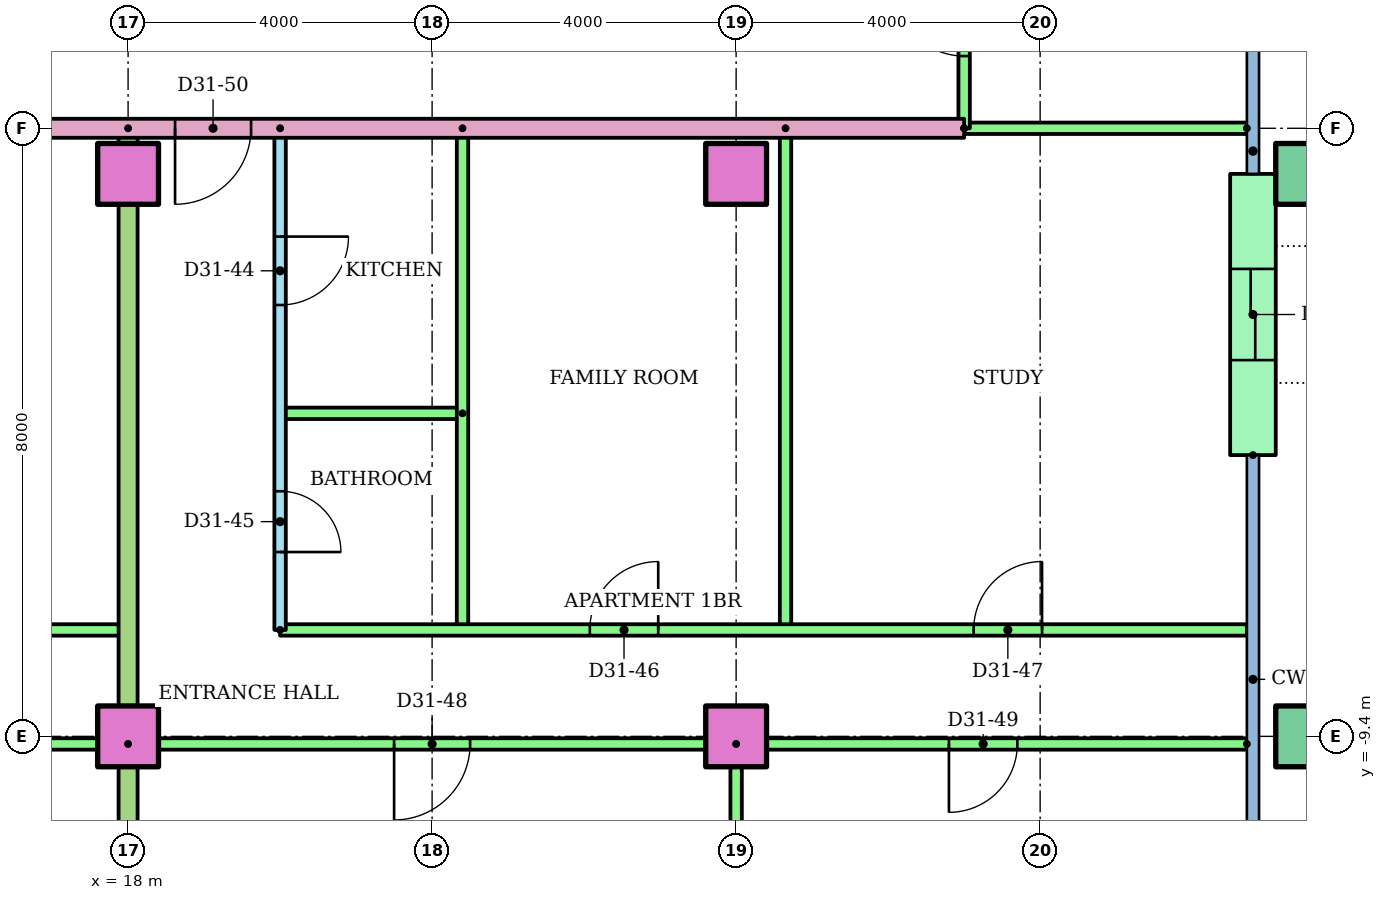
"""IFC4 building model, lengths in metres.
Left out: names, types, materials, properties, quantities, classifications, styles, units other than length and angle.
Written with IfcOpenShell. Run it as: python <this file> out.ifc"""

import sys

from ifc_helpers import new_model, si_unit, direction, frame, frame_2d, origin, origin_2d, place, context, subcontext, project, spatial, rectangle, hollow_rectangle, extrude, element, fill, save


model = new_model("IFC4")
c1 = context("Model", 3, precision=1e-05, world=origin(), true_north=direction((0.0, 1.0)))
c2 = subcontext(c1, "Body", "Model", "MODEL_VIEW")
j1 = project(units=[si_unit("LENGTHUNIT", "METRE"), si_unit("PLANEANGLEUNIT", "RADIAN")], contexts=[c1])
p1 = place(None, origin())
s1 = spatial("IfcSite", under=j1, at=p1, CompositionType="ELEMENT")
p2 = place(p1, origin())
s2 = spatial("IfcBuilding", under=s1, at=p2, CompositionType="ELEMENT")
p3 = place(p2, frame((0.0, 0.0, 123.0)))
s3 = spatial("IfcBuildingStorey", under=s2, at=p3, CompositionType="ELEMENT", Elevation=123.0)
for number, where in (
    (1, (18.0, -9.4, 0.0)),
    (2, (26.0, -9.4, 0.0)),
):
    element("IfcColumn", number, at=place(p3, frame(where)), inside=s3, PredefinedType="COLUMN", context=c2, shape_type="SweptSolid", body=[
        extrude(rectangle(XDim=0.8, YDim=0.8, at=origin_2d()), origin(), (0.0, 0.0, 1.0), 3.2),
    ])
p4 = place(p3, frame((33.5, -9.4, 0.0)))
e3 = element("IfcColumn", 3, at=p4, inside=s3, PredefinedType="COLUMN", context=c2, shape_type="SweptSolid", body=[
    extrude(hollow_rectangle(XDim=0.8, YDim=0.8, WallThickness=0.04, at=origin_2d()), origin(), (0.0, 0.0, 1.0), 3.2),
])
for number, where in (
    (4, (18.0, -2.0, 0.0)),
    (5, (26.0, -2.0, 0.0)),
):
    element("IfcColumn", number, at=place(p3, frame(where)), inside=s3, PredefinedType="COLUMN", context=c2, shape_type="SweptSolid", body=[
        extrude(rectangle(XDim=0.8, YDim=0.8, at=origin_2d()), origin(), (0.0, 0.0, 1.0), 3.2),
    ])
p5 = place(p3, frame((33.5, -2.0, 0.0)))
e6 = element("IfcColumn", 6, at=p5, inside=s3, PredefinedType="COLUMN", context=c2, shape_type="SweptSolid", body=[
    extrude(hollow_rectangle(XDim=0.8, YDim=0.8, WallThickness=0.04, at=origin_2d()), origin(), (0.0, 0.0, 1.0), 3.2),
])
p6 = place(p3, frame((32.8, -5.7, 0.0), z_axis=(0.0, 0.0, 1.0), x_axis=(0.0, 1.0, 0.0)))
e7 = element("IfcWall", 7, at=p6, inside=s3, PredefinedType="STANDARD", context=c2, shape_type="SweptSolid", body=[
    extrude(rectangle(XDim=3.7, YDim=0.6, at=frame_2d((1.85, 0.0))), origin(), (0.0, 0.0, 1.0), 2.92),
])
p7 = place(p6, frame((1.25, 0.0, 0.0)))
e8 = element("IfcOpeningElement", 8, at=p7, cuts=e7, PredefinedType="OPENING", context=c2, shape_type="SweptSolid", body=[
    extrude(rectangle(XDim=1.2, YDim=2.1, at=frame_2d((0.6, 1.05))), frame((0.0, 0.31, 0.0), z_axis=(0.0, -1.0, 0.0), x_axis=(1.0, 0.0, 0.0)), (0.0, 0.0, 1.0), 0.62),
])
p8 = place(p3, frame((4.0, -8.0, 0.0)))
e9 = element("IfcWall", 9, at=p8, inside=s3, PredefinedType="PARTITIONING", context=c2, shape_type="SweptSolid", body=[
    extrude(rectangle(XDim=14.0, YDim=0.15, at=frame_2d((7.0, 0.0))), origin(), (0.0, 0.0, 1.0), 2.4),
])
p9 = place(p8, frame((3.45, 0.0, 0.0)))
e10 = element("IfcOpeningElement", 10, at=p9, cuts=e9, PredefinedType="OPENING", context=c2, shape_type="SweptSolid", body=[
    extrude(rectangle(XDim=0.9, YDim=2.1, at=frame_2d((0.45, 1.05))), frame((0.0, 0.085, 0.0), z_axis=(0.0, -1.0, 0.0), x_axis=(1.0, 0.0, 0.0)), (0.0, 0.0, 1.0), 0.17),
])
p10 = place(p8, frame((6.825, 0.0, 0.0)))
e11 = element("IfcOpeningElement", 11, at=p10, cuts=e9, PredefinedType="OPENING", context=c2, shape_type="SweptSolid", body=[
    extrude(rectangle(XDim=0.9, YDim=2.1, at=frame_2d((0.45, 1.05))), frame((0.0, 0.085, 0.0), z_axis=(0.0, -1.0, 0.0), x_axis=(1.0, 0.0, 0.0)), (0.0, 0.0, 1.0), 0.17),
])
p11 = place(p8, frame((11.125, 0.0, 0.0)))
e12 = element("IfcOpeningElement", 12, at=p11, cuts=e9, PredefinedType="OPENING", context=c2, shape_type="SweptSolid", body=[
    extrude(rectangle(XDim=0.9, YDim=2.1, at=frame_2d((0.45, 1.05))), frame((0.0, 0.085, 0.0), z_axis=(0.0, -1.0, 0.0), x_axis=(1.0, 0.0, 0.0)), (0.0, 0.0, 1.0), 0.17),
])
p12 = place(p3, frame((18.0, -9.5, 0.0), z_axis=(0.0, 0.0, 1.0), x_axis=(-1.0, 0.0, 0.0)))
e13 = element("IfcWall", 13, at=p12, inside=s3, PredefinedType="PARTITIONING", context=c2, shape_type="SweptSolid", body=[
    extrude(rectangle(XDim=16.0, YDim=0.15, at=frame_2d((8.0, 0.0))), origin(), (0.0, 0.0, 1.0), 2.4),
])
p13 = place(p12, frame((13.55, 0.0, 0.0)))
e14 = element("IfcOpeningElement", 14, at=p13, cuts=e13, PredefinedType="OPENING", context=c2, shape_type="SweptSolid", body=[
    extrude(rectangle(XDim=0.9, YDim=2.1, at=frame_2d((0.45, 1.05))), frame((0.0, 0.085, 0.0), z_axis=(0.0, -1.0, 0.0), x_axis=(1.0, 0.0, 0.0)), (0.0, 0.0, 1.0), 0.17),
])
p14 = place(p12, frame((9.55, 0.0, 0.0)))
e15 = element("IfcOpeningElement", 15, at=p14, cuts=e13, PredefinedType="OPENING", context=c2, shape_type="SweptSolid", body=[
    extrude(rectangle(XDim=0.9, YDim=2.1, at=frame_2d((0.45, 1.05))), frame((0.0, 0.085, 0.0), z_axis=(0.0, -1.0, 0.0), x_axis=(1.0, 0.0, 0.0)), (0.0, 0.0, 1.0), 0.17),
])
p15 = place(p12, frame((3.5, 0.0, 0.0)))
e16 = element("IfcOpeningElement", 16, at=p15, cuts=e13, PredefinedType="OPENING", context=c2, shape_type="SweptSolid", body=[
    extrude(rectangle(XDim=1.0, YDim=2.1, at=frame_2d((0.5, 1.05))), frame((0.0, 0.085, 0.0), z_axis=(0.0, -1.0, 0.0), x_axis=(1.0, 0.0, 0.0)), (0.0, 0.0, 1.0), 0.17),
])
p16 = place(p3, frame((20.0, -1.4, 0.0), z_axis=(0.0, 0.0, 1.0), x_axis=(0.0, -1.0, 0.0)))
e17 = element("IfcWall", 17, at=p16, inside=s3, PredefinedType="PARTITIONING", context=c2, shape_type="SweptSolid", body=[
    extrude(rectangle(XDim=6.6, YDim=0.15, at=frame_2d((3.3, 0.0))), origin(), (0.0, 0.0, 1.0), 2.4),
])
p17 = place(p16, frame((1.425, 0.0, 0.0)))
e18 = element("IfcOpeningElement", 18, at=p17, cuts=e17, PredefinedType="OPENING", context=c2, shape_type="SweptSolid", body=[
    extrude(rectangle(XDim=0.9, YDim=2.1, at=frame_2d((0.45, 1.05))), frame((0.0, 0.085, 0.0), z_axis=(0.0, -1.0, 0.0), x_axis=(1.0, 0.0, 0.0)), (0.0, 0.0, 1.0), 0.17),
])
p18 = place(p16, frame((4.775, 0.0, 0.0)))
e19 = element("IfcOpeningElement", 19, at=p18, cuts=e17, PredefinedType="OPENING", context=c2, shape_type="SweptSolid", body=[
    extrude(rectangle(XDim=0.8, YDim=2.1, at=frame_2d((0.4, 1.05))), frame((0.0, 0.085, 0.0), z_axis=(0.0, -1.0, 0.0), x_axis=(1.0, 0.0, 0.0)), (0.0, 0.0, 1.0), 0.17),
])
p19 = place(p3, frame((22.4, -5.15, 0.0), z_axis=(0.0, 0.0, 1.0), x_axis=(-1.0, 0.0, 0.0)))
e20 = element("IfcWall", 20, at=p19, inside=s3, PredefinedType="PARTITIONING", context=c2, shape_type="SweptSolid", body=[
    extrude(rectangle(XDim=2.4, YDim=0.15, at=frame_2d((1.2, 0.0))), origin(), (0.0, 0.0, 1.0), 2.4),
])
for number, where, z_axis, x_axis in (
    (21, (22.4, -1.4, 0.0), (0.0, 0.0, 1.0), (0.0, -1.0, 0.0)),
    (22, (26.65, -1.4, 0.0), (0.0, 0.0, 1.0), (0.0, -1.0, 0.0)),
):
    element("IfcWall", number, at=place(p3, frame(where, z_axis=z_axis, x_axis=x_axis)), inside=s3, PredefinedType="PARTITIONING", context=c2, shape_type="SweptSolid", body=[
        extrude(rectangle(XDim=6.6, YDim=0.15, at=frame_2d((3.3, 0.0))), origin(), (0.0, 0.0, 1.0), 2.4),
    ])
p20 = place(p3, frame((20.0, -8.0, 0.0)))
e23 = element("IfcWall", 23, at=p20, inside=s3, PredefinedType="PARTITIONING", context=c2, shape_type="SweptSolid", body=[
    extrude(rectangle(XDim=12.72, YDim=0.15, at=frame_2d((6.36, 0.0))), origin(), (0.0, 0.0, 1.0), 2.4),
])
p21 = place(p20, frame((4.075, 0.0, 0.0)))
e24 = element("IfcOpeningElement", 24, at=p21, cuts=e23, PredefinedType="OPENING", context=c2, shape_type="SweptSolid", body=[
    extrude(rectangle(XDim=0.9, YDim=2.1, at=frame_2d((0.45, 1.05))), frame((0.0, 0.085, 0.0), z_axis=(0.0, -1.0, 0.0), x_axis=(1.0, 0.0, 0.0)), (0.0, 0.0, 1.0), 0.17),
])
p22 = place(p20, frame((9.125, 0.0, 0.0)))
e25 = element("IfcOpeningElement", 25, at=p22, cuts=e23, PredefinedType="OPENING", context=c2, shape_type="SweptSolid", body=[
    extrude(rectangle(XDim=0.9, YDim=2.1, at=frame_2d((0.45, 1.05))), frame((0.0, 0.085, 0.0), z_axis=(0.0, -1.0, 0.0), x_axis=(1.0, 0.0, 0.0)), (0.0, 0.0, 1.0), 0.17),
])
p23 = place(p3, frame((32.72, -9.5, 0.0), z_axis=(0.0, 0.0, 1.0), x_axis=(-1.0, 0.0, 0.0)))
e26 = element("IfcWall", 26, at=p23, inside=s3, PredefinedType="PARTITIONING", context=c2, shape_type="SweptSolid", body=[
    extrude(rectangle(XDim=14.72, YDim=0.15, at=frame_2d((7.36, 0.0))), origin(), (0.0, 0.0, 1.0), 2.4),
])
p24 = place(p23, frame((10.22, 0.0, 0.0)))
e27 = element("IfcOpeningElement", 27, at=p24, cuts=e26, PredefinedType="OPENING", context=c2, shape_type="SweptSolid", body=[
    extrude(rectangle(XDim=1.0, YDim=2.1, at=frame_2d((0.5, 1.05))), frame((0.0, 0.085, 0.0), z_axis=(0.0, -1.0, 0.0), x_axis=(1.0, 0.0, 0.0)), (0.0, 0.0, 1.0), 0.17),
])
p25 = place(p23, frame((3.02, 0.0, 0.0)))
e28 = element("IfcOpeningElement", 28, at=p25, cuts=e26, PredefinedType="OPENING", context=c2, shape_type="SweptSolid", body=[
    extrude(rectangle(XDim=0.9, YDim=2.1, at=frame_2d((0.45, 1.05))), frame((0.0, 0.085, 0.0), z_axis=(0.0, -1.0, 0.0), x_axis=(1.0, 0.0, 0.0)), (0.0, 0.0, 1.0), 0.17),
])
p26 = place(p3, frame((26.0, -9.5, 0.0), z_axis=(0.0, 0.0, 1.0), x_axis=(0.0, -1.0, 0.0)))
e29 = element("IfcWall", 29, at=p26, inside=s3, PredefinedType="PARTITIONING", context=c2, shape_type="SweptSolid", body=[
    extrude(rectangle(XDim=6.81, YDim=0.15, at=frame_2d((3.405, 0.0))), origin(), (0.0, 0.0, 1.0), 2.4),
])
p27 = place(p3, frame((18.0, -1.4, 0.0), z_axis=(0.0, 0.0, 1.0), x_axis=(0.0, -1.0, 0.0)))
e30 = element("IfcWall", 30, at=p27, inside=s3, PredefinedType="PARTITIONING", context=c2, shape_type="SweptSolid", body=[
    extrude(rectangle(XDim=14.91, YDim=0.25, at=frame_2d((7.455, 0.0))), origin(), (0.0, 0.0, 1.0), 2.4),
])
p28 = place(p3, frame((29.0, -1.4, 0.0), z_axis=(0.0, 0.0, 1.0), x_axis=(-1.0, 0.0, 0.0)))
e31 = element("IfcWall", 31, at=p28, inside=s3, PredefinedType="PARTITIONING", context=c2, shape_type="SweptSolid", body=[
    extrude(rectangle(XDim=15.0, YDim=0.25, at=frame_2d((7.5, 0.0))), origin(), (0.0, 0.0, 1.0), 2.4),
])
p29 = place(p28, frame((9.382, 0.0, 0.0)))
e32 = element("IfcOpeningElement", 32, at=p29, cuts=e31, PredefinedType="OPENING", context=c2, shape_type="SweptSolid", body=[
    extrude(rectangle(XDim=1.0, YDim=2.1, at=frame_2d((0.5, 1.05))), frame((0.0, 0.135, 0.0), z_axis=(0.0, -1.0, 0.0), x_axis=(1.0, 0.0, 0.0)), (0.0, 0.0, 1.0), 0.27),
])
p30 = place(p3, frame((32.72, -1.4, 0.0), z_axis=(0.0, 0.0, 1.0), x_axis=(-1.0, 0.0, 0.0)))
e33 = element("IfcWall", 33, at=p30, inside=s3, PredefinedType="PARTITIONING", context=c2, shape_type="SweptSolid", body=[
    extrude(rectangle(XDim=3.72, YDim=0.15, at=frame_2d((1.86, 0.0))), origin(), (0.0, 0.0, 1.0), 2.4),
])
p31 = place(p3, frame((29.0, -1.4, 0.0), z_axis=(0.0, 0.0, 1.0), x_axis=(0.0, 1.0, 0.0)))
e34 = element("IfcWall", 34, at=p31, inside=s3, PredefinedType="PARTITIONING", context=c2, shape_type="SweptSolid", body=[
    extrude(rectangle(XDim=2.8, YDim=0.15, at=frame_2d((1.4, 0.0))), origin(), (0.0, 0.0, 1.0), 2.4),
])
p32 = place(p31, frame((0.95, 0.0, 0.0)))
e35 = element("IfcOpeningElement", 35, at=p32, cuts=e34, PredefinedType="OPENING", context=c2, shape_type="SweptSolid", body=[
    extrude(rectangle(XDim=0.9, YDim=2.1, at=frame_2d((0.45, 1.05))), frame((0.0, 0.085, 0.0), z_axis=(0.0, -1.0, 0.0), x_axis=(1.0, 0.0, 0.0)), (0.0, 0.0, 1.0), 0.17),
])
p33 = place(p17, origin())
e36 = element("IfcDoor", 36, at=p33, inside=s3, OperationType="SINGLE_SWING_LEFT", PredefinedType="DOOR", context=c2, shape_type="SweptSolid", body=[
    extrude(rectangle(XDim=0.9, YDim=2.1, at=frame_2d((0.45, 1.05))), frame((0.0, 0.025, 0.0), z_axis=(0.0, -1.0, 0.0), x_axis=(1.0, 0.0, 0.0)), (0.0, 0.0, 1.0), 0.05),
])
fill(e18, e36)
p34 = place(p18, origin())
e37 = element("IfcDoor", 37, at=p34, inside=s3, OperationType="SINGLE_SWING_RIGHT", PredefinedType="DOOR", context=c2, shape_type="SweptSolid", body=[
    extrude(rectangle(XDim=0.8, YDim=2.1, at=frame_2d((0.4, 1.05))), frame((0.0, 0.025, 0.0), z_axis=(0.0, -1.0, 0.0), x_axis=(1.0, 0.0, 0.0)), (0.0, 0.0, 1.0), 0.05),
])
fill(e19, e37)
p35 = place(p21, origin())
e38 = element("IfcDoor", 38, at=p35, inside=s3, OperationType="SINGLE_SWING_RIGHT", PredefinedType="DOOR", context=c2, shape_type="SweptSolid", body=[
    extrude(rectangle(XDim=0.9, YDim=2.1, at=frame_2d((0.45, 1.05))), frame((0.0, 0.025, 0.0), z_axis=(0.0, -1.0, 0.0), x_axis=(1.0, 0.0, 0.0)), (0.0, 0.0, 1.0), 0.05),
])
fill(e24, e38)
p36 = place(p22, origin())
e39 = element("IfcDoor", 39, at=p36, inside=s3, OperationType="SINGLE_SWING_RIGHT", PredefinedType="DOOR", context=c2, shape_type="SweptSolid", body=[
    extrude(rectangle(XDim=0.9, YDim=2.1, at=frame_2d((0.45, 1.05))), frame((0.0, 0.025, 0.0), z_axis=(0.0, -1.0, 0.0), x_axis=(1.0, 0.0, 0.0)), (0.0, 0.0, 1.0), 0.05),
])
fill(e25, e39)
p37 = place(p24, origin())
e40 = element("IfcDoor", 40, at=p37, inside=s3, OperationType="SINGLE_SWING_RIGHT", PredefinedType="DOOR", context=c2, shape_type="SweptSolid", body=[
    extrude(rectangle(XDim=1.0, YDim=2.1, at=frame_2d((0.5, 1.05))), frame((0.0, 0.025, 0.0), z_axis=(0.0, -1.0, 0.0), x_axis=(1.0, 0.0, 0.0)), (0.0, 0.0, 1.0), 0.05),
])
fill(e27, e40)
p38 = place(p25, origin())
e41 = element("IfcDoor", 41, at=p38, inside=s3, OperationType="SINGLE_SWING_RIGHT", PredefinedType="DOOR", context=c2, shape_type="SweptSolid", body=[
    extrude(rectangle(XDim=0.9, YDim=2.1, at=frame_2d((0.45, 1.05))), frame((0.0, 0.025, 0.0), z_axis=(0.0, -1.0, 0.0), x_axis=(1.0, 0.0, 0.0)), (0.0, 0.0, 1.0), 0.05),
])
fill(e28, e41)
p39 = place(p29, origin())
e42 = element("IfcDoor", 42, at=p39, inside=s3, OperationType="SINGLE_SWING_RIGHT", PredefinedType="DOOR", context=c2, shape_type="SweptSolid", body=[
    extrude(rectangle(XDim=1.0, YDim=2.1, at=frame_2d((0.5, 1.05))), frame((0.0, 0.025, 0.0), z_axis=(0.0, -1.0, 0.0), x_axis=(1.0, 0.0, 0.0)), (0.0, 0.0, 1.0), 0.05),
])
fill(e32, e42)
p40 = place(p32, origin())
e43 = element("IfcDoor", 43, at=p40, inside=s3, OperationType="SINGLE_SWING_RIGHT", PredefinedType="DOOR", context=c2, shape_type="SweptSolid", body=[
    extrude(rectangle(XDim=0.9, YDim=2.1, at=frame_2d((0.45, 1.05))), frame((0.0, 0.025, 0.0), z_axis=(0.0, -1.0, 0.0), x_axis=(1.0, 0.0, 0.0)), (0.0, 0.0, 1.0), 0.05),
])
fill(e35, e43)
p41 = place(p7, origin())
e44 = element("IfcDoor", 44, at=p41, inside=s3, OperationType="SLIDING_TO_LEFT", PredefinedType="DOOR", context=c2, shape_type="SweptSolid", body=[
    extrude(rectangle(XDim=1.2, YDim=2.1, at=frame_2d((0.6, 1.05))), frame((0.0, 0.025, 0.0), z_axis=(0.0, -1.0, 0.0), x_axis=(1.0, 0.0, 0.0)), (0.0, 0.0, 1.0), 0.05),
])
fill(e8, e44)
save(model, sys.argv[1])
